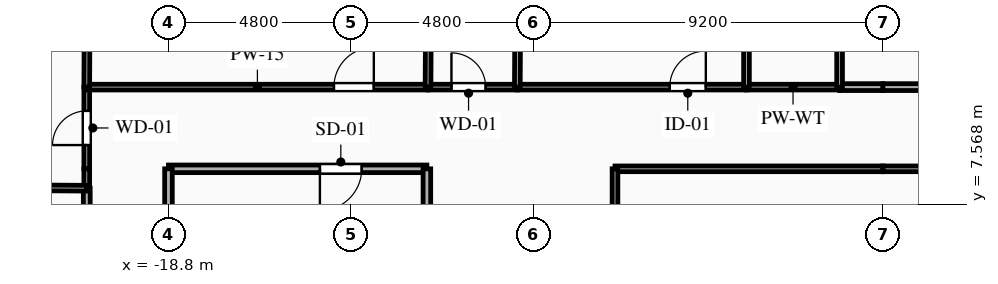
"""IFC4 building model, lengths in metres.
Left out: names, types, materials, properties, quantities, classifications, styles, units other than length and angle.
Written with IfcOpenShell. Run it as: python <this file> out.ifc"""

import sys

from ifc_helpers import new_model, si_unit, direction, frame, frame_2d, origin, place, context, subcontext, project, spatial, rectangle, extrude, element, fill, save


model = new_model("IFC4")
c1 = context("Model", 3, precision=1e-05, world=origin(), true_north=direction((0.0, 1.0)))
c2 = subcontext(c1, "Body", "Model", "MODEL_VIEW")
j1 = project(units=[si_unit("LENGTHUNIT", "METRE"), si_unit("PLANEANGLEUNIT", "RADIAN")], contexts=[c1])
p1 = place(None, origin())
s1 = spatial("IfcSite", under=j1, at=p1, CompositionType="ELEMENT")
p2 = place(p1, origin())
s2 = spatial("IfcBuilding", under=s1, at=p2, CompositionType="ELEMENT")
p3 = place(p2, frame((0.0, 0.0, 206.45)))
s3 = spatial("IfcBuildingStorey", under=s2, at=p3, CompositionType="ELEMENT", Elevation=206.45)
p4 = place(p3, frame((-12.0, 8.5, 0.0), z_axis=(0.0, 0.0, 1.0), x_axis=(-1.0, 0.0, 0.0)))
e1 = element("IfcWall", 1, at=p4, inside=s3, PredefinedType="PARTITIONING", context=c2, shape_type="SweptSolid", body=[
    extrude(rectangle(XDim=6.8, YDim=0.2, at=frame_2d((3.4, 0.0))), origin(), (0.0, 0.0, 1.0), 3.04),
])
p5 = place(p4, frame((1.715, 0.0, 0.0)))
e2 = element("IfcOpeningElement", 2, at=p5, cuts=e1, PredefinedType="OPENING", context=c2, shape_type="SweptSolid", body=[
    extrude(rectangle(XDim=1.1, YDim=2.15, at=frame_2d((0.55, 1.075))), frame((0.0, 0.11, 0.0), z_axis=(0.0, -1.0, 0.0), x_axis=(1.0, 0.0, 0.0)), (0.0, 0.0, 1.0), 0.22),
])
p6 = place(p3, frame((-18.8, 8.5, 0.0), z_axis=(0.0, 0.0, 1.0), x_axis=(0.0, -1.0, 0.0)))
e3 = element("IfcWall", 3, at=p6, inside=s3, PredefinedType="PARTITIONING", context=c2, shape_type="SweptSolid", body=[
    extrude(rectangle(XDim=2.9, YDim=0.2, at=frame_2d((1.45, 0.0))), origin(), (0.0, 0.0, 1.0), 2.665),
])
p7 = place(p3, frame((-12.0, 5.6, 0.0), z_axis=(0.0, 0.0, 1.0), x_axis=(0.0, 1.0, 0.0)))
e4 = element("IfcWall", 4, at=p7, inside=s3, PredefinedType="PARTITIONING", context=c2, shape_type="SweptSolid", body=[
    extrude(rectangle(XDim=2.9, YDim=0.2, at=frame_2d((1.45, 0.0))), origin(), (0.0, 0.0, 1.0), 3.04),
])
p8 = place(p3, frame((-20.95, 8.5, 0.0), z_axis=(0.0, 0.0, 1.0), x_axis=(0.0, 1.0, 0.0)))
e5 = element("IfcWall", 5, at=p8, inside=s3, PredefinedType="PARTITIONING", context=c2, shape_type="SweptSolid", body=[
    extrude(rectangle(XDim=2.15, YDim=0.15, at=frame_2d((1.075, 0.0))), origin(), (0.0, 0.0, 1.0), 3.04),
])
p9 = place(p8, frame((0.625, 0.0, 0.0)))
e6 = element("IfcOpeningElement", 6, at=p9, cuts=e5, PredefinedType="OPENING", context=c2, shape_type="SweptSolid", body=[
    extrude(rectangle(XDim=0.9, YDim=2.1, at=frame_2d((0.45, 1.05))), frame((0.0, 0.085, 0.0), z_axis=(0.0, -1.0, 0.0), x_axis=(1.0, 0.0, 0.0)), (0.0, 0.0, 1.0), 0.17),
])
p10 = place(p3, frame((-20.95, 10.65, 0.0), z_axis=(0.0, 0.0, 1.0), x_axis=(1.0, 0.0, 0.0)))
e7 = element("IfcWall", 7, at=p10, inside=s3, PredefinedType="PARTITIONING", context=c2, shape_type="SweptSolid", body=[
    extrude(rectangle(XDim=8.98, YDim=0.15, at=frame_2d((4.49, 0.0))), origin(), (0.0, 0.0, 1.0), 3.04),
])
p11 = place(p10, frame((6.504, 0.0, 0.0)))
e8 = element("IfcOpeningElement", 8, at=p11, cuts=e7, PredefinedType="OPENING", context=c2, shape_type="SweptSolid", body=[
    extrude(rectangle(XDim=1.05, YDim=2.15, at=frame_2d((0.525, 1.075))), frame((0.0, 0.085, 0.0), z_axis=(0.0, -1.0, 0.0), x_axis=(1.0, 0.0, 0.0)), (0.0, 0.0, 1.0), 0.17),
])
p12 = place(p3, frame((-11.97, 10.65, 0.0), z_axis=(0.0, 0.0, 1.0), x_axis=(1.0, 0.0, 0.0)))
e9 = element("IfcWall", 9, at=p12, inside=s3, PredefinedType="PLUMBINGWALL", context=c2, shape_type="SweptSolid", body=[
    extrude(rectangle(XDim=2.35, YDim=0.15, at=frame_2d((1.175, 0.0))), origin(), (0.0, 0.0, 1.0), 3.04),
])
p13 = place(p12, frame((0.616, 0.0, 0.0)))
e10 = element("IfcOpeningElement", 10, at=p13, cuts=e9, PredefinedType="OPENING", context=c2, shape_type="SweptSolid", body=[
    extrude(rectangle(XDim=0.9, YDim=2.1, at=frame_2d((0.45, 1.05))), frame((0.0, 0.085, 0.0), z_axis=(0.0, -1.0, 0.0), x_axis=(1.0, 0.0, 0.0)), (0.0, 0.0, 1.0), 0.17),
])
p14 = place(p3, frame((-9.62, 10.65, 0.0), z_axis=(0.0, 0.0, 1.0), x_axis=(1.0, 0.0, 0.0)))
e11 = element("IfcWall", 11, at=p14, inside=s3, PredefinedType="PARTITIONING", context=c2, shape_type="SweptSolid", body=[
    extrude(rectangle(XDim=6.03, YDim=0.15, at=frame_2d((3.015, 0.0))), origin(), (0.0, 0.0, 1.0), 3.04),
])
p15 = place(p14, frame((4.01, 0.0, 0.0)))
e12 = element("IfcOpeningElement", 12, at=p15, cuts=e11, PredefinedType="OPENING", context=c2, shape_type="SweptSolid", body=[
    extrude(rectangle(XDim=0.95, YDim=2.1, at=frame_2d((0.475, 1.05))), frame((0.0, 0.085, 0.0), z_axis=(0.0, -1.0, 0.0), x_axis=(1.0, 0.0, 0.0)), (0.0, 0.0, 1.0), 0.17),
])
p16 = place(p3, frame((-1.14, 10.65, 0.0), z_axis=(0.0, 0.0, 1.0), x_axis=(1.0, 0.0, 0.0)))
e13 = element("IfcWall", 13, at=p16, inside=s3, PredefinedType="PARTITIONING", context=c2, shape_type="SweptSolid", body=[
    extrude(rectangle(XDim=1.14, YDim=0.18, at=frame_2d((0.57, 0.0))), origin(), (0.0, 0.0, 1.0), 3.04),
])
p17 = place(p3, frame((-3.59, 10.65, 0.0), z_axis=(0.0, 0.0, 1.0), x_axis=(1.0, 0.0, 0.0)))
e14 = element("IfcWall", 14, at=p17, inside=s3, PredefinedType="PLUMBINGWALL", context=c2, shape_type="SweptSolid", body=[
    extrude(rectangle(XDim=2.45, YDim=0.15, at=frame_2d((1.225, 0.0))), origin(), (0.0, 0.0, 1.0), 3.04),
])
p18 = place(p3, frame((0.0, 8.5, 0.0), z_axis=(0.0, 0.0, 1.0), x_axis=(-1.0, 0.0, 0.0)))
e15 = element("IfcWall", 15, at=p18, inside=s3, PredefinedType="PARTITIONING", context=c2, shape_type="SweptSolid", body=[
    extrude(rectangle(XDim=7.05, YDim=0.15, at=frame_2d((3.525, 0.0))), origin(), (0.0, 0.0, 1.0), 3.04),
])
p19 = place(p3, frame((0.0, 10.65, 0.0), z_axis=(0.0, 0.0, 1.0), x_axis=(1.0, 0.0, 0.0)))
e16 = element("IfcWall", 16, at=p19, inside=s3, PredefinedType="PARTITIONING", context=c2, shape_type="SweptSolid", body=[
    extrude(rectangle(XDim=4.79, YDim=0.18, at=frame_2d((2.395, 0.0))), origin(), (0.0, 0.0, 1.0), 3.04),
])
p20 = place(p19, frame((2.224, 0.0, 0.0)))
e17 = element("IfcOpeningElement", 17, at=p20, cuts=e16, PredefinedType="OPENING", context=c2, shape_type="SweptSolid", body=[
    extrude(rectangle(XDim=1.0, YDim=2.15, at=frame_2d((0.5, 1.075))), frame((0.0, 0.1, 0.0), z_axis=(0.0, -1.0, 0.0), x_axis=(1.0, 0.0, 0.0)), (0.0, 0.0, 1.0), 0.2),
])
p21 = place(p3, frame((7.05, 8.5, 0.0), z_axis=(0.0, 0.0, 1.0), x_axis=(-1.0, 0.0, 0.0)))
e18 = element("IfcWall", 18, at=p21, inside=s3, PredefinedType="PARTITIONING", context=c2, shape_type="SweptSolid", body=[
    extrude(rectangle(XDim=7.05, YDim=0.15, at=frame_2d((3.525, 0.0))), origin(), (0.0, 0.0, 1.0), 3.04),
])
p22 = place(p3, frame((-20.95, -1.306, 0.0), z_axis=(0.0, 0.0, 1.0), x_axis=(0.0, 1.0, 0.0)))
e19 = element("IfcWall", 19, at=p22, inside=s3, PredefinedType="PARTITIONING", context=c2, shape_type="SweptSolid", body=[
    extrude(rectangle(XDim=9.296, YDim=0.18, at=frame_2d((4.648, 0.0))), origin(), (0.0, 0.0, 1.0), 3.04),
])
p23 = place(p22, frame((1.472, 0.0, 0.0)))
e20 = element("IfcOpeningElement", 20, at=p23, cuts=e19, PredefinedType="OPENING", context=c2, shape_type="SweptSolid", body=[
    extrude(rectangle(XDim=1.0, YDim=2.15, at=frame_2d((0.5, 1.075))), frame((0.0, 0.1, 0.0), z_axis=(0.0, -1.0, 0.0), x_axis=(1.0, 0.0, 0.0)), (0.0, 0.0, 1.0), 0.2),
])
p24 = place(p3, frame((-20.95, 7.99, 0.0), z_axis=(0.0, 0.0, 1.0), x_axis=(0.0, 1.0, 0.0)))
e21 = element("IfcWall", 21, at=p24, inside=s3, PredefinedType="PARTITIONING", context=c2, shape_type="SweptSolid", body=[
    extrude(rectangle(XDim=0.51, YDim=0.15, at=frame_2d((0.255, 0.0))), origin(), (0.0, 0.0, 1.0), 3.04),
])
p25 = place(p3, frame((-7.05, 8.5, 0.0), z_axis=(0.0, 0.0, 1.0), x_axis=(0.0, -1.0, 0.0)))
e22 = element("IfcWall", 22, at=p25, inside=s3, PredefinedType="PARTITIONING", context=c2, shape_type="SweptSolid", body=[
    extrude(rectangle(XDim=9.3, YDim=0.15, at=frame_2d((4.65, 0.0))), origin(), (0.0, 0.0, 1.0), 3.04),
])
p26 = place(p3, frame((-27.419, 8.034, 0.0), z_axis=(0.0, 0.0, 1.0), x_axis=(0.999976928608, -0.006792808784, 0.0)))
e23 = element("IfcWall", 23, at=p26, inside=s3, PredefinedType="PARTITIONING", context=c2, shape_type="SweptSolid", body=[
    extrude(rectangle(XDim=6.469, YDim=0.15, at=frame_2d((3.235, 0.0))), origin(), (0.0, 0.0, 1.0), 3.04),
])
p27 = place(p3, frame((-20.906, 19.662, 0.0), z_axis=(0.0, 0.0, 1.0), x_axis=(-0.004876272857, -0.999988110911, 0.0)))
e24 = element("IfcWall", 24, at=p27, inside=s3, PredefinedType="PARTITIONING", context=c2, shape_type="SweptSolid", body=[
    extrude(rectangle(XDim=9.012, YDim=0.15, at=frame_2d((4.506, 0.0))), origin(), (0.0, 0.0, 1.0), 2.665),
])
p28 = place(p3, frame((-11.926, 18.718, 0.0), z_axis=(0.0, 0.0, 1.0), x_axis=(-0.005446707114, -0.999985166581, 0.0)))
e25 = element("IfcWall", 25, at=p28, inside=s3, PredefinedType="PLUMBINGWALL", context=c2, shape_type="SweptSolid", body=[
    extrude(rectangle(XDim=8.068, YDim=0.15, at=frame_2d((4.034, 0.0))), origin(), (0.0, 0.0, 1.0), 3.04),
])
p29 = place(p3, frame((-9.576, 18.471, 0.0), z_axis=(0.0, 0.0, 1.0), x_axis=(-0.005618590299, -0.999984215597, 0.0)))
e26 = element("IfcWall", 26, at=p29, inside=s3, PredefinedType="PLUMBINGWALL", context=c2, shape_type="SweptSolid", body=[
    extrude(rectangle(XDim=7.822, YDim=0.15, at=frame_2d((3.911, 0.0))), origin(), (0.0, 0.0, 1.0), 3.04),
])
for number, where, z_axis, x_axis in (
    (27, (-3.59, 12.8, 0.0), (0.0, 0.0, 1.0), (0.0, -1.0, 0.0)),
    (28, (-1.14, 10.65, 0.0), (0.0, 0.0, 1.0), (0.0, 1.0, 0.0)),
):
    element("IfcWall", number, at=place(p3, frame(where, z_axis=z_axis, x_axis=x_axis)), inside=s3, PredefinedType="PLUMBINGWALL", context=c2, shape_type="SweptSolid", body=[
        extrude(rectangle(XDim=2.15, YDim=0.15, at=frame_2d((1.075, 0.0))), origin(), (0.0, 0.0, 1.0), 3.04),
    ])
p30 = place(p5, origin())
e29 = element("IfcDoor", 29, at=p30, inside=s3, OperationType="SINGLE_SWING_RIGHT", PredefinedType="DOOR", context=c2, shape_type="SweptSolid", body=[
    extrude(rectangle(XDim=1.1, YDim=2.15, at=frame_2d((0.55, 1.075))), frame((0.0, 0.025, 0.0), z_axis=(0.0, -1.0, 0.0), x_axis=(1.0, 0.0, 0.0)), (0.0, 0.0, 1.0), 0.05),
])
fill(e2, e29)
p31 = place(p9, origin())
e30 = element("IfcDoor", 30, at=p31, inside=s3, OperationType="SINGLE_SWING_LEFT", PredefinedType="DOOR", context=c2, shape_type="SweptSolid", body=[
    extrude(rectangle(XDim=0.9, YDim=2.1, at=frame_2d((0.45, 1.05))), frame((0.0, 0.025, 0.0), z_axis=(0.0, -1.0, 0.0), x_axis=(1.0, 0.0, 0.0)), (0.0, 0.0, 1.0), 0.05),
])
fill(e6, e30)
p32 = place(p11, origin())
e31 = element("IfcDoor", 31, at=p32, inside=s3, OperationType="SINGLE_SWING_RIGHT", PredefinedType="DOOR", context=c2, shape_type="SweptSolid", body=[
    extrude(rectangle(XDim=1.05, YDim=2.15, at=frame_2d((0.525, 1.075))), frame((0.0, 0.025, 0.0), z_axis=(0.0, -1.0, 0.0), x_axis=(1.0, 0.0, 0.0)), (0.0, 0.0, 1.0), 0.05),
])
fill(e8, e31)
p33 = place(p13, origin())
e32 = element("IfcDoor", 32, at=p33, inside=s3, OperationType="SINGLE_SWING_LEFT", PredefinedType="DOOR", context=c2, shape_type="SweptSolid", body=[
    extrude(rectangle(XDim=0.9, YDim=2.1, at=frame_2d((0.45, 1.05))), frame((0.0, 0.025, 0.0), z_axis=(0.0, -1.0, 0.0), x_axis=(1.0, 0.0, 0.0)), (0.0, 0.0, 1.0), 0.05),
])
fill(e10, e32)
p34 = place(p15, origin())
e33 = element("IfcDoor", 33, at=p34, inside=s3, OperationType="SINGLE_SWING_RIGHT", PredefinedType="DOOR", context=c2, shape_type="SweptSolid", body=[
    extrude(rectangle(XDim=0.95, YDim=2.1, at=frame_2d((0.475, 1.05))), frame((0.0, 0.025, 0.0), z_axis=(0.0, -1.0, 0.0), x_axis=(1.0, 0.0, 0.0)), (0.0, 0.0, 1.0), 0.05),
])
fill(e12, e33)
save(model, sys.argv[1])
